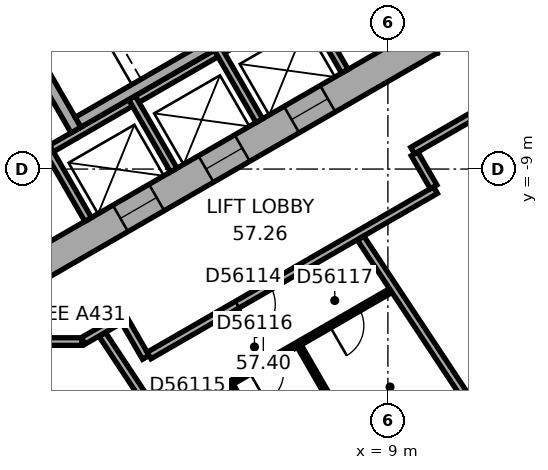
"""IFC4 building model, lengths in metres.
Left out: names, types, materials, properties, quantities, classifications, styles, units other than length and angle.
Written with IfcOpenShell. Run it as: python <this file> out.ifc"""

import sys

from ifc_helpers import new_model, si_unit, direction, frame, frame_2d, origin, place, context, subcontext, project, spatial, rectangle, extrude, element, fill, save


model = new_model("IFC4")
c1 = context("Model", 3, precision=1e-05, world=origin(), true_north=direction((0.0, 1.0)))
c2 = subcontext(c1, "Body", "Model", "MODEL_VIEW")
j1 = project(units=[si_unit("LENGTHUNIT", "METRE"), si_unit("PLANEANGLEUNIT", "RADIAN")], contexts=[c1])
p1 = place(None, origin())
s1 = spatial("IfcSite", under=j1, at=p1, CompositionType="ELEMENT")
p2 = place(p1, origin())
s2 = spatial("IfcBuilding", under=s1, at=p2, CompositionType="ELEMENT")
p3 = place(p2, frame((0.0, 0.0, 232.8)))
s3 = spatial("IfcBuildingStorey", under=s2, at=p3, CompositionType="ELEMENT", Elevation=232.8)
p4 = place(p3, frame((9.9, -5.947, 0.0), z_axis=(0.0, 0.0, 1.0), x_axis=(0.0, 1.0, 0.0)))
e1 = element("IfcWall", 1, at=p4, inside=s3, PredefinedType="SHEAR", context=c2, shape_type="SweptSolid", body=[
    extrude(rectangle(XDim=11.894, YDim=0.8, at=frame_2d((5.947, 0.0))), origin(), (0.0, 0.0, 1.0), 3.7),
])
p5 = place(p4, frame((6.147, 0.0, 0.0)))
e2 = element("IfcOpeningElement", 2, at=p5, cuts=e1, PredefinedType="OPENING", context=c2, shape_type="SweptSolid", body=[
    extrude(rectangle(XDim=1.5, YDim=2.1, at=frame_2d((0.75, 1.05))), frame((0.0, 0.41, 0.0), z_axis=(0.0, -1.0, 0.0), x_axis=(1.0, 0.0, 0.0)), (0.0, 0.0, 1.0), 0.82),
])
p6 = place(p4, frame((2.997, 0.0, 0.0)))
e3 = element("IfcOpeningElement", 3, at=p6, cuts=e1, PredefinedType="OPENING", context=c2, shape_type="SweptSolid", body=[
    extrude(rectangle(XDim=0.9, YDim=2.1, at=frame_2d((0.45, 1.05))), frame((0.0, 0.41, 0.0), z_axis=(0.0, -1.0, 0.0), x_axis=(1.0, 0.0, 0.0)), (0.0, 0.0, 1.0), 0.82),
])
p7 = place(p3, frame((-10.1, -5.6, 0.0), z_axis=(0.0, 0.0, 1.0), x_axis=(0.866023897231, -0.500002609418, 0.0)))
e4 = element("IfcWall", 4, at=p7, inside=s3, PredefinedType="SHEAR", context=c2, shape_type="SweptSolid", body=[
    extrude(rectangle(XDim=11.894, YDim=0.8, at=frame_2d((5.947, 0.0))), origin(), (0.0, 0.0, 1.0), 3.7),
])
p8 = place(p7, frame((6.147, 0.0, 0.0)))
e5 = element("IfcOpeningElement", 5, at=p8, cuts=e4, PredefinedType="OPENING", context=c2, shape_type="SweptSolid", body=[
    extrude(rectangle(XDim=1.5, YDim=2.1, at=frame_2d((0.75, 1.05))), frame((0.0, 0.41, 0.0), z_axis=(0.0, -1.0, 0.0), x_axis=(1.0, 0.0, 0.0)), (0.0, 0.0, 1.0), 0.82),
])
p9 = place(p7, frame((1.597, 0.0, 0.0)))
e6 = element("IfcOpeningElement", 6, at=p9, cuts=e4, PredefinedType="OPENING", context=c2, shape_type="SweptSolid", body=[
    extrude(rectangle(XDim=1.1, YDim=2.1, at=frame_2d((0.55, 1.05))), frame((0.0, 0.41, 0.0), z_axis=(0.0, -1.0, 0.0), x_axis=(1.0, 0.0, 0.0)), (0.0, 0.0, 1.0), 0.82),
])
p10 = place(p7, frame((4.197, 0.0, 0.0)))
e7 = element("IfcOpeningElement", 7, at=p10, cuts=e4, PredefinedType="OPENING", context=c2, shape_type="SweptSolid", body=[
    extrude(rectangle(XDim=1.1, YDim=2.1, at=frame_2d((0.55, 1.05))), frame((0.0, 0.41, 0.0), z_axis=(0.0, -1.0, 0.0), x_axis=(1.0, 0.0, 0.0)), (0.0, 0.0, 1.0), 0.82),
])
p11 = place(p3, frame((-0.2, -11.547, 0.0), z_axis=(0.0, 0.0, 1.0), x_axis=(0.866023897231, 0.500002609418, 0.0)))
e8 = element("IfcWall", 8, at=p11, inside=s3, PredefinedType="SHEAR", context=c2, shape_type="SweptSolid", body=[
    extrude(rectangle(XDim=11.894, YDim=0.8, at=frame_2d((5.947, 0.0))), origin(), (0.0, 0.0, 1.0), 3.7),
])
p12 = place(p11, frame((2.497, 0.0, 0.0)))
e9 = element("IfcOpeningElement", 9, at=p12, cuts=e8, PredefinedType="OPENING", context=c2, shape_type="SweptSolid", body=[
    extrude(rectangle(XDim=1.1, YDim=2.1, at=frame_2d((0.55, 1.05))), frame((0.0, 0.41, 0.0), z_axis=(0.0, -1.0, 0.0), x_axis=(1.0, 0.0, 0.0)), (0.0, 0.0, 1.0), 0.82),
])
p13 = place(p11, frame((5.097, 0.0, 0.0)))
e10 = element("IfcOpeningElement", 10, at=p13, cuts=e8, PredefinedType="OPENING", context=c2, shape_type="SweptSolid", body=[
    extrude(rectangle(XDim=1.1, YDim=2.1, at=frame_2d((0.55, 1.05))), frame((0.0, 0.41, 0.0), z_axis=(0.0, -1.0, 0.0), x_axis=(1.0, 0.0, 0.0)), (0.0, 0.0, 1.0), 0.82),
])
p14 = place(p11, frame((7.697, 0.0, 0.0)))
e11 = element("IfcOpeningElement", 11, at=p14, cuts=e8, PredefinedType="OPENING", context=c2, shape_type="SweptSolid", body=[
    extrude(rectangle(XDim=1.1, YDim=2.1, at=frame_2d((0.55, 1.05))), frame((0.0, 0.41, 0.0), z_axis=(0.0, -1.0, 0.0), x_axis=(1.0, 0.0, 0.0)), (0.0, 0.0, 1.0), 0.82),
])
p15 = place(p3, frame((2.739, -22.711, 0.0), z_axis=(0.0, 0.0, 1.0), x_axis=(0.833885723098, 0.551937134838, 0.0)))
e12 = element("IfcWall", 12, at=p15, inside=s3, PredefinedType="STANDARD", context=c2, shape_type="SweptSolid", body=[
    extrude(rectangle(XDim=18.841, YDim=0.2, at=frame_2d((9.421, 0.0))), origin(), (0.0, 0.0, 1.0), 3.7),
])
p16 = place(p15, frame((1.252, 0.0, 0.9)))
e13 = element("IfcOpeningElement", 13, at=p16, cuts=e12, PredefinedType="OPENING", context=c2, shape_type="SweptSolid", body=[
    extrude(rectangle(XDim=2.2, YDim=2.0, at=frame_2d((1.1, 1.0))), frame((0.0, 0.11, 0.0), z_axis=(0.0, -1.0, 0.0), x_axis=(1.0, 0.0, 0.0)), (0.0, 0.0, 1.0), 0.22),
])
p17 = place(p15, frame((4.786, 0.0, 0.9)))
e14 = element("IfcOpeningElement", 14, at=p17, cuts=e12, PredefinedType="OPENING", context=c2, shape_type="SweptSolid", body=[
    extrude(rectangle(XDim=2.2, YDim=2.0, at=frame_2d((1.1, 1.0))), frame((0.0, 0.11, 0.0), z_axis=(0.0, -1.0, 0.0), x_axis=(1.0, 0.0, 0.0)), (0.0, 0.0, 1.0), 0.22),
])
p18 = place(p15, frame((8.32, 0.0, 0.9)))
e15 = element("IfcOpeningElement", 15, at=p18, cuts=e12, PredefinedType="OPENING", context=c2, shape_type="SweptSolid", body=[
    extrude(rectangle(XDim=2.2, YDim=2.0, at=frame_2d((1.1, 1.0))), frame((0.0, 0.11, 0.0), z_axis=(0.0, -1.0, 0.0), x_axis=(1.0, 0.0, 0.0)), (0.0, 0.0, 1.0), 0.22),
])
p19 = place(p15, frame((11.854, 0.0, 0.9)))
e16 = element("IfcOpeningElement", 16, at=p19, cuts=e12, PredefinedType="OPENING", context=c2, shape_type="SweptSolid", body=[
    extrude(rectangle(XDim=2.2, YDim=2.0, at=frame_2d((1.1, 1.0))), frame((0.0, 0.11, 0.0), z_axis=(0.0, -1.0, 0.0), x_axis=(1.0, 0.0, 0.0)), (0.0, 0.0, 1.0), 0.22),
])
p20 = place(p15, frame((15.387, 0.0, 0.9)))
e17 = element("IfcOpeningElement", 17, at=p20, cuts=e12, PredefinedType="OPENING", context=c2, shape_type="SweptSolid", body=[
    extrude(rectangle(XDim=2.2, YDim=2.0, at=frame_2d((1.1, 1.0))), frame((0.0, 0.11, 0.0), z_axis=(0.0, -1.0, 0.0), x_axis=(1.0, 0.0, 0.0)), (0.0, 0.0, 1.0), 0.22),
])
p21 = place(p3, frame((-0.024, -8.559, 0.0), z_axis=(0.0, 0.0, 1.0), x_axis=(0.866026010844, 0.49999894854, 0.0)))
e18 = element("IfcWall", 18, at=p21, inside=s3, PredefinedType="PARTITIONING", context=c2, shape_type="SweptSolid", body=[
    extrude(rectangle(XDim=8.0, YDim=0.2, at=frame_2d((4.0, 0.0))), origin(), (0.0, 0.0, 1.0), 3.42),
])
for number, where, z_axis, x_axis in (
    (19, (0.013, -8.422, 0.0), (0.0, 0.0, 1.0), (0.5, -0.866, 0.0)),
    (20, (2.264, -7.122, 0.0), (0.0, 0.0, 1.0), (0.5, -0.866, 0.0)),
    (21, (4.516, -5.822, 0.0), (0.0, 0.0, 1.0), (0.5, -0.866, 0.0)),
    (22, (6.768, -4.522, 0.0), (0.0, 0.0, 1.0), (0.5, -0.866, 0.0)),
):
    element("IfcWall", number, at=place(p3, frame(where, z_axis=z_axis, x_axis=x_axis)), inside=s3, PredefinedType="PARTITIONING", context=c2, shape_type="SweptSolid", body=[
        extrude(rectangle(XDim=2.2, YDim=0.2, at=frame_2d((1.1, 0.0))), origin(), (0.0, 0.0, 1.0), 3.42),
    ])
p22 = place(p3, frame((-1.558, -3.902, 0.0), z_axis=(0.0, 0.0, 1.0), x_axis=(0.499977259774, -0.866038532462, 0.0)))
e23 = element("IfcWall", 23, at=p22, inside=s3, PredefinedType="SHEAR", context=c2, shape_type="SweptSolid", body=[
    extrude(rectangle(XDim=4.7, YDim=0.3, at=frame_2d((2.35, 0.0))), origin(), (0.0, 0.0, 1.0), 3.42),
])
p23 = place(p22, frame((0.8, 0.0, 0.0)))
e24 = element("IfcOpeningElement", 24, at=p23, cuts=e23, PredefinedType="OPENING", context=c2, shape_type="SweptSolid", body=[
    extrude(rectangle(XDim=1.2, YDim=2.1, at=frame_2d((0.6, 1.05))), frame((0.0, 0.16, 0.0), z_axis=(0.0, -1.0, 0.0), x_axis=(1.0, 0.0, 0.0)), (0.0, 0.0, 1.0), 0.32),
])
p24 = place(p3, frame((0.847, -7.767, 0.0), z_axis=(0.0, 0.0, 1.0), x_axis=(0.866027801685, 0.499995846692, 0.0)))
e25 = element("IfcWall", 25, at=p24, inside=s3, PredefinedType="SHEAR", context=c2, shape_type="SweptSolid", body=[
    extrude(rectangle(XDim=7.06, YDim=0.3, at=frame_2d((3.53, 0.0))), origin(), (0.0, 0.0, 1.0), 3.42),
])
p25 = place(p3, frame((-0.95, -13.539, 0.0), z_axis=(0.0, 0.0, 1.0), x_axis=(1.0, 0.0, 0.0)))
e26 = element("IfcWall", 26, at=p25, inside=s3, PredefinedType="PARTITIONING", context=c2, shape_type="SweptSolid", body=[
    extrude(rectangle(XDim=1.9, YDim=0.2, at=frame_2d((0.95, 0.0))), origin(), (0.0, 0.0, 1.0), 3.42),
])
p26 = place(p3, frame((0.985, -13.519, 0.0), z_axis=(0.0, 0.0, 1.0), x_axis=(0.866054082991, 0.499950322867, 0.0)))
e27 = element("IfcWall", 27, at=p26, inside=s3, PredefinedType="PARTITIONING", context=c2, shape_type="SweptSolid", body=[
    extrude(rectangle(XDim=1.206, YDim=0.2, at=frame_2d((0.603, 0.0))), origin(), (0.0, 0.0, 1.0), 3.42),
])
p27 = place(p3, frame((2.079, -13.003, 0.0), z_axis=(0.0, 0.0, 1.0), x_axis=(0.500074377092, -0.865982457891, 0.0)))
e28 = element("IfcWall", 28, at=p27, inside=s3, PredefinedType="PARTITIONING", context=c2, shape_type="SweptSolid", body=[
    extrude(rectangle(XDim=1.101, YDim=0.2, at=frame_2d((0.55, 0.0))), origin(), (0.0, 0.0, 1.0), 3.42),
])
p28 = place(p3, frame((2.716, -13.906, 0.0), z_axis=(0.0, 0.0, 1.0), x_axis=(0.866040290674, 0.499974214264, 0.0)))
e29 = element("IfcWall", 29, at=p28, inside=s3, PredefinedType="PARTITIONING", context=c2, shape_type="SweptSolid", body=[
    extrude(rectangle(XDim=8.702, YDim=0.2, at=frame_2d((4.351, 0.0))), origin(), (0.0, 0.0, 1.0), 3.42),
])
p29 = place(p28, frame((2.679, 0.0, 0.0)))
e30 = element("IfcOpeningElement", 30, at=p29, cuts=e29, PredefinedType="OPENING", context=c2, shape_type="SweptSolid", body=[
    extrude(rectangle(XDim=1.0, YDim=2.1, at=frame_2d((0.5, 1.05))), frame((0.0, 0.11, 0.0), z_axis=(0.0, -1.0, 0.0), x_axis=(1.0, 0.0, 0.0)), (0.0, 0.0, 1.0), 0.22),
])
p30 = place(p3, frame((3.117, -15.638, 0.0), z_axis=(0.0, 0.0, 1.0), x_axis=(0.866031365477, 0.499989673903, 0.0)))
e31 = element("IfcWall", 31, at=p30, inside=s3, PredefinedType="PARTITIONING", context=c2, shape_type="SweptSolid", body=[
    extrude(rectangle(XDim=6.881, YDim=0.12, at=frame_2d((3.44, 0.0))), origin(), (0.0, 0.0, 1.0), 3.42),
])
p31 = place(p30, frame((0.5, 0.0, 0.0)))
e32 = element("IfcOpeningElement", 32, at=p31, cuts=e31, PredefinedType="OPENING", context=c2, shape_type="SweptSolid", body=[
    extrude(rectangle(XDim=1.0, YDim=2.1, at=frame_2d((0.5, 1.05))), frame((0.0, 0.07, 0.0), z_axis=(0.0, -1.0, 0.0), x_axis=(1.0, 0.0, 0.0)), (0.0, 0.0, 1.0), 0.14),
])
p32 = place(p30, frame((2.583, 0.0, 0.0)))
e33 = element("IfcOpeningElement", 33, at=p32, cuts=e31, PredefinedType="OPENING", context=c2, shape_type="SweptSolid", body=[
    extrude(rectangle(XDim=0.9, YDim=2.1, at=frame_2d((0.45, 1.05))), frame((0.0, 0.07, 0.0), z_axis=(0.0, -1.0, 0.0), x_axis=(1.0, 0.0, 0.0)), (0.0, 0.0, 1.0), 0.14),
])
p33 = place(p30, frame((5.023, 0.0, 0.0)))
e34 = element("IfcOpeningElement", 34, at=p33, cuts=e31, PredefinedType="OPENING", context=c2, shape_type="SweptSolid", body=[
    extrude(rectangle(XDim=0.9, YDim=2.1, at=frame_2d((0.45, 1.05))), frame((0.0, 0.07, 0.0), z_axis=(0.0, -1.0, 0.0), x_axis=(1.0, 0.0, 0.0)), (0.0, 0.0, 1.0), 0.14),
])
p34 = place(p3, frame((5.677, -19.687, 0.0), z_axis=(0.0, 0.0, 1.0), x_axis=(-0.551936619203, 0.833886064389, 0.0)))
e35 = element("IfcWall", 35, at=p34, inside=s3, PredefinedType="PARTITIONING", context=c2, shape_type="SweptSolid", body=[
    extrude(rectangle(XDim=7.592, YDim=0.2, at=frame_2d((3.796, 0.0))), origin(), (0.0, 0.0, 1.0), 3.42),
])
p35 = place(p3, frame((6.169, -16.924, 0.0), z_axis=(0.0, 0.0, 1.0), x_axis=(-0.500047388771, 0.865998042136, 0.0)))
e36 = element("IfcWall", 36, at=p35, inside=s3, PredefinedType="PARTITIONING", context=c2, shape_type="SweptSolid", body=[
    extrude(rectangle(XDim=2.58, YDim=0.12, at=frame_2d((1.29, 0.0))), origin(), (0.0, 0.0, 1.0), 3.42),
])
p36 = place(p3, frame((8.912, -17.545, 0.0), z_axis=(0.0, 0.0, 1.0), x_axis=(-0.500022113525, 0.866012636158, 0.0)))
e37 = element("IfcWall", 37, at=p36, inside=s3, PredefinedType="PARTITIONING", context=c2, shape_type="SweptSolid", body=[
    extrude(rectangle(XDim=4.49, YDim=0.12, at=frame_2d((2.245, 0.0))), origin(), (0.0, 0.0, 1.0), 2.87),
])
p37 = place(p3, frame((9.652, -8.515, 0.0), z_axis=(0.0, 0.0, 1.0), x_axis=(0.866020375458, 0.500008709215, 0.0)))
e38 = element("IfcWall", 38, at=p37, inside=s3, PredefinedType="PARTITIONING", context=c2, shape_type="SweptSolid", body=[
    extrude(rectangle(XDim=1.846, YDim=0.2, at=frame_2d((0.923, 0.0))), origin(), (0.0, 0.0, 1.0), 3.42),
])
p38 = place(p3, frame((10.202, -9.469, 0.0), z_axis=(0.0, 0.0, 1.0), x_axis=(-0.499968756647, 0.866043441391, 0.0)))
e39 = element("IfcWall", 39, at=p38, inside=s3, PredefinedType="PARTITIONING", context=c2, shape_type="SweptSolid", body=[
    extrude(rectangle(XDim=1.001, YDim=0.2, at=frame_2d((0.5, 0.0))), origin(), (0.0, 0.0, 1.0), 3.42),
])
p39 = place(p3, frame((11.571, -15.786, 0.0), z_axis=(0.0, 0.0, 1.0), x_axis=(-0.551944861763, 0.833880608705, 0.0)))
e40 = element("IfcWall", 40, at=p39, inside=s3, PredefinedType="PARTITIONING", context=c2, shape_type="SweptSolid", body=[
    extrude(rectangle(XDim=5.957, YDim=0.2, at=frame_2d((2.979, 0.0))), origin(), (0.0, 0.0, 1.0), 3.42),
])
p40 = place(p12, origin())
e41 = element("IfcDoor", 41, at=p40, inside=s3, OperationType="DOUBLE_DOOR_SLIDING", PredefinedType="DOOR", context=c2, shape_type="SweptSolid", body=[
    extrude(rectangle(XDim=1.1, YDim=2.1, at=frame_2d((0.55, 1.05))), frame((0.0, 0.025, 0.0), z_axis=(0.0, -1.0, 0.0), x_axis=(1.0, 0.0, 0.0)), (0.0, 0.0, 1.0), 0.05),
])
fill(e9, e41)
p41 = place(p13, origin())
e42 = element("IfcDoor", 42, at=p41, inside=s3, OperationType="DOUBLE_DOOR_SLIDING", PredefinedType="DOOR", context=c2, shape_type="SweptSolid", body=[
    extrude(rectangle(XDim=1.1, YDim=2.1, at=frame_2d((0.55, 1.05))), frame((0.0, 0.025, 0.0), z_axis=(0.0, -1.0, 0.0), x_axis=(1.0, 0.0, 0.0)), (0.0, 0.0, 1.0), 0.05),
])
fill(e10, e42)
p42 = place(p14, origin())
e43 = element("IfcDoor", 43, at=p42, inside=s3, OperationType="DOUBLE_DOOR_SLIDING", PredefinedType="DOOR", context=c2, shape_type="SweptSolid", body=[
    extrude(rectangle(XDim=1.1, YDim=2.1, at=frame_2d((0.55, 1.05))), frame((0.0, 0.025, 0.0), z_axis=(0.0, -1.0, 0.0), x_axis=(1.0, 0.0, 0.0)), (0.0, 0.0, 1.0), 0.05),
])
fill(e11, e43)
p43 = place(p29, origin())
e44 = element("IfcDoor", 44, at=p43, inside=s3, OperationType="SINGLE_SWING_LEFT", PredefinedType="DOOR", context=c2, shape_type="SweptSolid", body=[
    extrude(rectangle(XDim=1.0, YDim=2.1, at=frame_2d((0.5, 1.05))), frame((0.0, 0.025, 0.0), z_axis=(0.0, -1.0, 0.0), x_axis=(1.0, 0.0, 0.0)), (0.0, 0.0, 1.0), 0.05),
])
fill(e30, e44)
p44 = place(p32, origin())
e45 = element("IfcDoor", 45, at=p44, inside=s3, OperationType="SINGLE_SWING_LEFT", PredefinedType="DOOR", context=c2, shape_type="SweptSolid", body=[
    extrude(rectangle(XDim=0.9, YDim=2.1, at=frame_2d((0.45, 1.05))), frame((0.0, 0.025, 0.0), z_axis=(0.0, -1.0, 0.0), x_axis=(1.0, 0.0, 0.0)), (0.0, 0.0, 1.0), 0.05),
])
fill(e33, e45)
p45 = place(p33, origin())
e46 = element("IfcDoor", 46, at=p45, inside=s3, OperationType="SINGLE_SWING_LEFT", PredefinedType="DOOR", context=c2, shape_type="SweptSolid", body=[
    extrude(rectangle(XDim=0.9, YDim=2.1, at=frame_2d((0.45, 1.05))), frame((0.0, 0.025, 0.0), z_axis=(0.0, -1.0, 0.0), x_axis=(1.0, 0.0, 0.0)), (0.0, 0.0, 1.0), 0.05),
])
fill(e34, e46)
save(model, sys.argv[1])
